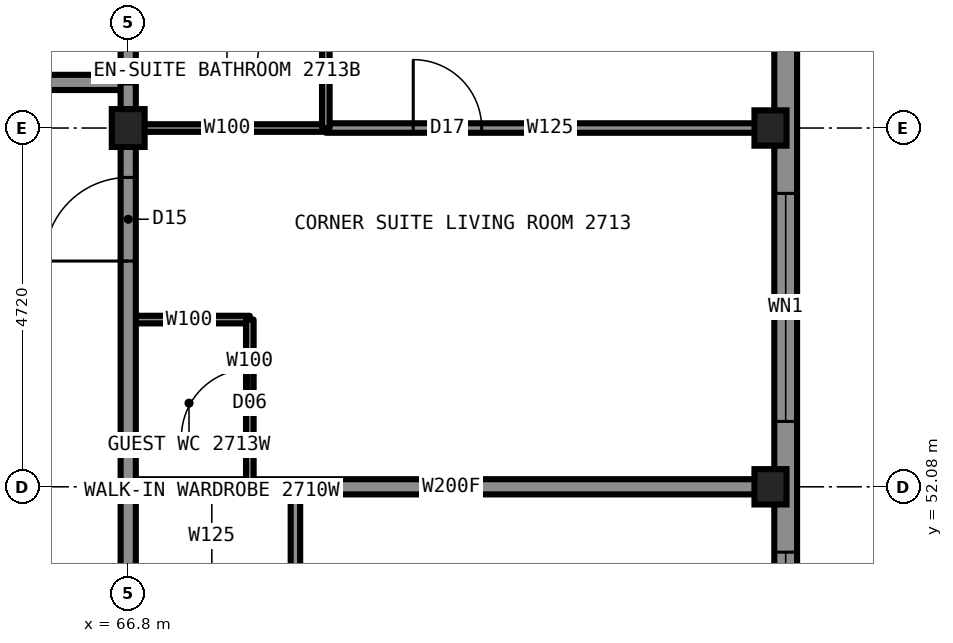
"""IFC4 building model, lengths in metres.
Left out: names, types, materials, properties, quantities, classifications, styles, units other than length and angle.
Written with IfcOpenShell. Run it as: python <this file> out.ifc"""

import sys

from ifc_helpers import new_model, si_unit, direction, frame, frame_2d, origin, origin_2d, place, context, subcontext, project, spatial, rectangle, i_section, extrude, element, fill, save


model = new_model("IFC4")
c1 = context("Model", 3, precision=1e-05, world=origin(), true_north=direction((0.0, 1.0)))
c2 = subcontext(c1, "Body", "Model", "MODEL_VIEW")
j1 = project(units=[si_unit("LENGTHUNIT", "METRE"), si_unit("PLANEANGLEUNIT", "RADIAN")], contexts=[c1])
p1 = place(None, origin())
s1 = spatial("IfcSite", under=j1, at=p1, CompositionType="ELEMENT")
p2 = place(p1, origin())
s2 = spatial("IfcBuilding", under=s1, at=p2, CompositionType="ELEMENT")
p3 = place(p2, frame((0.0, 0.0, 103.9)))
s3 = spatial("IfcBuildingStorey", under=s2, at=p3, CompositionType="ELEMENT", Elevation=103.9)
for number, where, z_axis, x_axis in (
    (1, (75.25, 52.08, 0.0), (0.0, 0.0, 1.0), (1.0, 0.0, 0.0)),
    (2, (75.25, 56.8, 0.0), (0.0, 0.0, 1.0), (1.0, 0.0, 0.0)),
):
    element("IfcColumn", number, at=place(p3, frame(where, z_axis=z_axis, x_axis=x_axis)), inside=s3, PredefinedType="COLUMN", context=c2, shape_type="SweptSolid", body=[
        extrude(i_section(OverallWidth=0.422, OverallDepth=0.465, WebThickness=0.045, FlangeThickness=0.073, at=origin_2d()), origin(), (0.0, 0.0, 1.0), 3.5),
    ])
p4 = place(p3, frame((66.8, 56.8, 0.0), z_axis=(0.0, 0.0, 1.0), x_axis=(1.0, 0.0, 0.0)))
e3 = element("IfcColumn", 3, at=p4, inside=s3, PredefinedType="COLUMN", context=c2, shape_type="SweptSolid", body=[
    extrude(i_section(OverallWidth=0.432, OverallDepth=0.498, WebThickness=0.056, FlangeThickness=0.089, at=origin_2d()), origin(), (0.0, 0.0, 1.0), 3.5),
])
p5 = place(p3, frame((66.8, 56.8, 0.0), z_axis=(0.0, 0.0, 1.0), x_axis=(1.0, 0.0, 0.0)))
e4 = element("IfcWall", 4, at=p5, inside=s3, PredefinedType="PARTITIONING", context=c2, shape_type="SweptSolid", body=[
    extrude(rectangle(XDim=2.6, YDim=0.1, at=frame_2d((1.3, 0.0))), origin(), (0.0, 0.0, 1.0), 2.573),
])
p6 = place(p3, frame((69.4, 56.8, 0.0), z_axis=(0.0, 0.0, 1.0), x_axis=(1.0, 0.0, 0.0)))
e5 = element("IfcWall", 5, at=p6, inside=s3, PredefinedType="PARTITIONING", context=c2, shape_type="SweptSolid", body=[
    extrude(rectangle(XDim=5.9, YDim=0.125, at=frame_2d((2.95, 0.0))), origin(), (0.0, 0.0, 1.0), 2.573),
])
p7 = place(p6, frame((1.15, 0.0, 0.0)))
e6 = element("IfcOpeningElement", 6, at=p7, cuts=e5, PredefinedType="OPENING", context=c2, shape_type="SweptSolid", body=[
    extrude(rectangle(XDim=0.9, YDim=2.2, at=frame_2d((0.45, 1.1))), frame((0.0, 0.073, 0.0), z_axis=(0.0, -1.0, 0.0), x_axis=(1.0, 0.0, 0.0)), (0.0, 0.0, 1.0), 0.145),
])
p8 = place(p3, frame((43.2, 57.4, 0.0), z_axis=(0.0, 0.0, 1.0), x_axis=(1.0, 0.0, 0.0)))
e7 = element("IfcWall", 7, at=p8, inside=s3, PredefinedType="PARTITIONING", context=c2, shape_type="SweptSolid", body=[
    extrude(rectangle(XDim=23.6, YDim=0.2, at=frame_2d((11.8, 0.0))), origin(), (0.0, 0.0, 1.0), 3.33),
])
p9 = place(p8, frame((2.55, 0.0, 0.0)))
e8 = element("IfcOpeningElement", 8, at=p9, cuts=e7, PredefinedType="OPENING", context=c2, shape_type="SweptSolid", body=[
    extrude(rectangle(XDim=1.0, YDim=2.2, at=frame_2d((0.5, 1.1))), frame((0.0, 0.11, 0.0), z_axis=(0.0, -1.0, 0.0), x_axis=(1.0, 0.0, 0.0)), (0.0, 0.0, 1.0), 0.22),
])
p10 = place(p8, frame((7.72, 0.0, 0.0)))
e9 = element("IfcOpeningElement", 9, at=p10, cuts=e7, PredefinedType="OPENING", context=c2, shape_type="SweptSolid", body=[
    extrude(rectangle(XDim=1.0, YDim=2.2, at=frame_2d((0.5, 1.1))), frame((0.0, 0.11, 0.0), z_axis=(0.0, -1.0, 0.0), x_axis=(1.0, 0.0, 0.0)), (0.0, 0.0, 1.0), 0.22),
])
p11 = place(p8, frame((14.56, 0.0, 0.0)))
e10 = element("IfcOpeningElement", 10, at=p11, cuts=e7, PredefinedType="OPENING", context=c2, shape_type="SweptSolid", body=[
    extrude(rectangle(XDim=1.0, YDim=2.2, at=frame_2d((0.5, 1.1))), frame((0.0, 0.11, 0.0), z_axis=(0.0, -1.0, 0.0), x_axis=(1.0, 0.0, 0.0)), (0.0, 0.0, 1.0), 0.22),
])
p12 = place(p8, frame((20.34, 0.0, 0.0)))
e11 = element("IfcOpeningElement", 11, at=p12, cuts=e7, PredefinedType="OPENING", context=c2, shape_type="SweptSolid", body=[
    extrude(rectangle(XDim=1.0, YDim=2.2, at=frame_2d((0.5, 1.1))), frame((0.0, 0.11, 0.0), z_axis=(0.0, -1.0, 0.0), x_axis=(1.0, 0.0, 0.0)), (0.0, 0.0, 1.0), 0.22),
])
p13 = place(p3, frame((66.8, 52.08, 0.0), z_axis=(0.0, 0.0, 1.0), x_axis=(1.0, 0.0, 0.0)))
e12 = element("IfcWall", 12, at=p13, inside=s3, PredefinedType="PARTITIONING", context=c2, shape_type="SweptSolid", body=[
    extrude(rectangle(XDim=8.5, YDim=0.2, at=frame_2d((4.25, 0.0))), origin(), (0.0, 0.0, 1.0), 2.573),
])
p14 = place(p3, frame((66.8, 54.28, 0.0), z_axis=(0.0, 0.0, 1.0), x_axis=(1.0, 0.0, 0.0)))
e13 = element("IfcWall", 13, at=p14, inside=s3, PredefinedType="PARTITIONING", context=c2, shape_type="SweptSolid", body=[
    extrude(rectangle(XDim=1.6, YDim=0.1, at=frame_2d((0.8, 0.0))), origin(), (0.0, 0.0, 1.0), 3.33),
])
p15 = place(p3, frame((66.8, 33.2, 0.0), z_axis=(0.0, 0.0, 1.0), x_axis=(0.0, 1.0, 0.0)))
e14 = element("IfcWall", 14, at=p15, inside=s3, PredefinedType="PARTITIONING", context=c2, shape_type="SweptSolid", body=[
    extrude(rectangle(XDim=23.58, YDim=0.2, at=frame_2d((11.79, 0.0))), origin(), (0.0, 0.0, 1.0), 3.33),
])
p16 = place(p15, frame((6.98, 0.0, 0.0)))
e15 = element("IfcOpeningElement", 15, at=p16, cuts=e14, PredefinedType="OPENING", context=c2, shape_type="SweptSolid", body=[
    extrude(rectangle(XDim=1.0, YDim=2.2, at=frame_2d((0.5, 1.1))), frame((0.0, 0.11, 0.0), z_axis=(0.0, -1.0, 0.0), x_axis=(1.0, 0.0, 0.0)), (0.0, 0.0, 1.0), 0.22),
])
p17 = place(p15, frame((12.59, 0.0, 0.0)))
e16 = element("IfcOpeningElement", 16, at=p17, cuts=e14, PredefinedType="OPENING", context=c2, shape_type="SweptSolid", body=[
    extrude(rectangle(XDim=1.0, YDim=2.2, at=frame_2d((0.5, 1.1))), frame((0.0, 0.11, 0.0), z_axis=(0.0, -1.0, 0.0), x_axis=(1.0, 0.0, 0.0)), (0.0, 0.0, 1.0), 0.22),
])
p18 = place(p15, frame((16.42, 0.0, 0.0)))
e17 = element("IfcOpeningElement", 17, at=p18, cuts=e14, PredefinedType="OPENING", context=c2, shape_type="SweptSolid", body=[
    extrude(rectangle(XDim=1.0, YDim=2.2, at=frame_2d((0.5, 1.1))), frame((0.0, 0.11, 0.0), z_axis=(0.0, -1.0, 0.0), x_axis=(1.0, 0.0, 0.0)), (0.0, 0.0, 1.0), 0.22),
])
p19 = place(p15, frame((21.85, 0.0, 0.0)))
e18 = element("IfcOpeningElement", 18, at=p19, cuts=e14, PredefinedType="OPENING", context=c2, shape_type="SweptSolid", body=[
    extrude(rectangle(XDim=1.1, YDim=2.2, at=frame_2d((0.55, 1.1))), frame((0.0, 0.11, 0.0), z_axis=(0.0, -1.0, 0.0), x_axis=(1.0, 0.0, 0.0)), (0.0, 0.0, 1.0), 0.22),
])
p20 = place(p15, frame((0.65, 0.0, 0.0)))
e19 = element("IfcOpeningElement", 19, at=p20, cuts=e14, PredefinedType="OPENING", context=c2, shape_type="SweptSolid", body=[
    extrude(rectangle(XDim=1.1, YDim=2.2, at=frame_2d((0.55, 1.1))), frame((0.0, 0.11, 0.0), z_axis=(0.0, -1.0, 0.0), x_axis=(1.0, 0.0, 0.0)), (0.0, 0.0, 1.0), 0.22),
])
p21 = place(p3, frame((66.8, 57.4, 0.0), z_axis=(0.0, 0.0, 1.0), x_axis=(0.0, 1.0, 0.0)))
e20 = element("IfcWall", 20, at=p21, inside=s3, PredefinedType="PARTITIONING", context=c2, shape_type="SweptSolid", body=[
    extrude(rectangle(XDim=7.9, YDim=0.2, at=frame_2d((3.95, 0.0))), origin(), (0.0, 0.0, 1.0), 2.573),
])
p22 = place(p3, frame((68.4, 52.08, 0.0), z_axis=(0.0, 0.0, 1.0), x_axis=(0.0, 1.0, 0.0)))
e21 = element("IfcWall", 21, at=p22, inside=s3, PredefinedType="PARTITIONING", context=c2, shape_type="SweptSolid", body=[
    extrude(rectangle(XDim=2.2, YDim=0.1, at=frame_2d((1.1, 0.0))), origin(), (0.0, 0.0, 1.0), 3.33),
])
p23 = place(p22, frame((0.65, 0.0, 0.0)))
e22 = element("IfcOpeningElement", 22, at=p23, cuts=e21, PredefinedType="OPENING", context=c2, shape_type="SweptSolid", body=[
    extrude(rectangle(XDim=0.9, YDim=2.1, at=frame_2d((0.45, 1.05))), frame((0.0, 0.06, 0.0), z_axis=(0.0, -1.0, 0.0), x_axis=(1.0, 0.0, 0.0)), (0.0, 0.0, 1.0), 0.12),
])
p24 = place(p3, frame((69.0, 50.88, 0.0), z_axis=(0.0, 0.0, 1.0), x_axis=(0.0, 1.0, 0.0)))
e23 = element("IfcWall", 23, at=p24, inside=s3, PredefinedType="PARTITIONING", context=c2, shape_type="SweptSolid", body=[
    extrude(rectangle(XDim=1.2, YDim=0.125, at=frame_2d((0.6, 0.0))), origin(), (0.0, 0.0, 1.0), 3.33),
])
p25 = place(p3, frame((69.4, 56.8, 0.0), z_axis=(0.0, 0.0, 1.0), x_axis=(0.0, 1.0, 0.0)))
e24 = element("IfcWall", 24, at=p25, inside=s3, PredefinedType="PARTITIONING", context=c2, shape_type="SweptSolid", body=[
    extrude(rectangle(XDim=2.6, YDim=0.1, at=frame_2d((1.3, 0.0))), origin(), (0.0, 0.0, 1.0), 3.33),
])
p26 = place(p25, frame((0.85, 0.0, 0.0)))
e25 = element("IfcOpeningElement", 25, at=p26, cuts=e24, PredefinedType="OPENING", context=c2, shape_type="SweptSolid", body=[
    extrude(rectangle(XDim=0.9, YDim=2.1, at=frame_2d((0.45, 1.05))), frame((0.0, 0.06, 0.0), z_axis=(0.0, -1.0, 0.0), x_axis=(1.0, 0.0, 0.0)), (0.0, 0.0, 1.0), 0.12),
])
p27 = place(p3, frame((75.45, 29.9, 0.0), z_axis=(0.0, 0.0, 1.0), x_axis=(0.0, 1.0, 0.0)))
e26 = element("IfcWall", 26, at=p27, inside=s3, PredefinedType="SOLIDWALL", context=c2, shape_type="SweptSolid", body=[
    extrude(rectangle(XDim=30.2, YDim=0.3, at=frame_2d((15.1, 0.0))), origin(), (0.0, 0.0, 1.0), 2.83),
])
p28 = place(p27, frame((4.16, 0.0, 0.5)))
e27 = element("IfcOpeningElement", 27, at=p28, cuts=e26, PredefinedType="OPENING", context=c2, shape_type="SweptSolid", body=[
    extrude(rectangle(XDim=3.0, YDim=2.0, at=frame_2d((1.5, 1.0))), frame((0.0, 0.16, 0.0), z_axis=(0.0, -1.0, 0.0), x_axis=(1.0, 0.0, 0.0)), (0.0, 0.0, 1.0), 0.32),
])
p29 = place(p27, frame((8.88, 0.0, 0.5)))
e28 = element("IfcOpeningElement", 28, at=p29, cuts=e26, PredefinedType="OPENING", context=c2, shape_type="SweptSolid", body=[
    extrude(rectangle(XDim=3.0, YDim=2.0, at=frame_2d((1.5, 1.0))), frame((0.0, 0.16, 0.0), z_axis=(0.0, -1.0, 0.0), x_axis=(1.0, 0.0, 0.0)), (0.0, 0.0, 1.0), 0.32),
])
p30 = place(p27, frame((13.6, 0.0, 0.5)))
e29 = element("IfcOpeningElement", 29, at=p30, cuts=e26, PredefinedType="OPENING", context=c2, shape_type="SweptSolid", body=[
    extrude(rectangle(XDim=3.0, YDim=2.0, at=frame_2d((1.5, 1.0))), frame((0.0, 0.16, 0.0), z_axis=(0.0, -1.0, 0.0), x_axis=(1.0, 0.0, 0.0)), (0.0, 0.0, 1.0), 0.32),
])
p31 = place(p27, frame((18.32, 0.0, 0.5)))
e30 = element("IfcOpeningElement", 30, at=p31, cuts=e26, PredefinedType="OPENING", context=c2, shape_type="SweptSolid", body=[
    extrude(rectangle(XDim=3.0, YDim=2.0, at=frame_2d((1.5, 1.0))), frame((0.0, 0.16, 0.0), z_axis=(0.0, -1.0, 0.0), x_axis=(1.0, 0.0, 0.0)), (0.0, 0.0, 1.0), 0.32),
])
p32 = place(p27, frame((23.04, 0.0, 0.5)))
e31 = element("IfcOpeningElement", 31, at=p32, cuts=e26, PredefinedType="OPENING", context=c2, shape_type="SweptSolid", body=[
    extrude(rectangle(XDim=3.0, YDim=2.0, at=frame_2d((1.5, 1.0))), frame((0.0, 0.16, 0.0), z_axis=(0.0, -1.0, 0.0), x_axis=(1.0, 0.0, 0.0)), (0.0, 0.0, 1.0), 0.32),
])
p33 = place(p3, frame((66.8, 56.78, 0.0), z_axis=(0.0, 0.0, 1.0), x_axis=(0.0, 1.0, 0.0)))
e32 = element("IfcWall", 32, at=p33, inside=s3, PredefinedType="PARTITIONING", context=c2, shape_type="SweptSolid", body=[
    extrude(rectangle(XDim=0.62, YDim=0.2, at=frame_2d((0.31, 0.0))), origin(), (0.0, 0.0, 1.0), 2.573),
])
p34 = place(p19, origin())
e33 = element("IfcDoor", 33, at=p34, inside=s3, OperationType="SINGLE_SWING_LEFT", PredefinedType="DOOR", context=c2, shape_type="SweptSolid", body=[
    extrude(rectangle(XDim=1.1, YDim=2.2, at=frame_2d((0.55, 1.1))), frame((0.0, 0.025, 0.0), z_axis=(0.0, -1.0, 0.0), x_axis=(1.0, 0.0, 0.0)), (0.0, 0.0, 1.0), 0.05),
])
fill(e18, e33)
p35 = place(p26, origin())
e34 = element("IfcDoor", 34, at=p35, inside=s3, OperationType="SINGLE_SWING_RIGHT", PredefinedType="DOOR", context=c2, shape_type="SweptSolid", body=[
    extrude(rectangle(XDim=0.9, YDim=2.1, at=frame_2d((0.45, 1.05))), frame((0.0, 0.025, 0.0), z_axis=(0.0, -1.0, 0.0), x_axis=(1.0, 0.0, 0.0)), (0.0, 0.0, 1.0), 0.05),
])
fill(e25, e34)
p36 = place(p7, origin())
e35 = element("IfcDoor", 35, at=p36, inside=s3, OperationType="SINGLE_SWING_LEFT", PredefinedType="DOOR", context=c2, shape_type="SweptSolid", body=[
    extrude(rectangle(XDim=0.9, YDim=2.2, at=frame_2d((0.45, 1.1))), frame((0.0, 0.025, 0.0), z_axis=(0.0, -1.0, 0.0), x_axis=(1.0, 0.0, 0.0)), (0.0, 0.0, 1.0), 0.05),
])
fill(e6, e35)
p37 = place(p23, origin())
e36 = element("IfcDoor", 36, at=p37, inside=s3, OperationType="SINGLE_SWING_LEFT", PredefinedType="DOOR", context=c2, shape_type="SweptSolid", body=[
    extrude(rectangle(XDim=0.9, YDim=2.1, at=frame_2d((0.45, 1.05))), frame((0.0, 0.025, 0.0), z_axis=(0.0, -1.0, 0.0), x_axis=(1.0, 0.0, 0.0)), (0.0, 0.0, 1.0), 0.05),
])
fill(e22, e36)
p38 = place(p31, origin())
e37 = element("IfcWindow", 37, at=p38, inside=s3, PartitioningType="SINGLE_PANEL", PredefinedType="WINDOW", context=c2, shape_type="SweptSolid", body=[
    extrude(rectangle(XDim=3.0, YDim=2.0, at=frame_2d((1.5, 1.0))), frame((0.0, 0.03, 0.0), z_axis=(0.0, -1.0, 0.0), x_axis=(1.0, 0.0, 0.0)), (0.0, 0.0, 1.0), 0.06),
])
fill(e30, e37)
p39 = place(p32, origin())
e38 = element("IfcWindow", 38, at=p39, inside=s3, PartitioningType="SINGLE_PANEL", PredefinedType="WINDOW", context=c2, shape_type="SweptSolid", body=[
    extrude(rectangle(XDim=3.0, YDim=2.0, at=frame_2d((1.5, 1.0))), frame((0.0, 0.03, 0.0), z_axis=(0.0, -1.0, 0.0), x_axis=(1.0, 0.0, 0.0)), (0.0, 0.0, 1.0), 0.06),
])
fill(e31, e38)
save(model, sys.argv[1])
